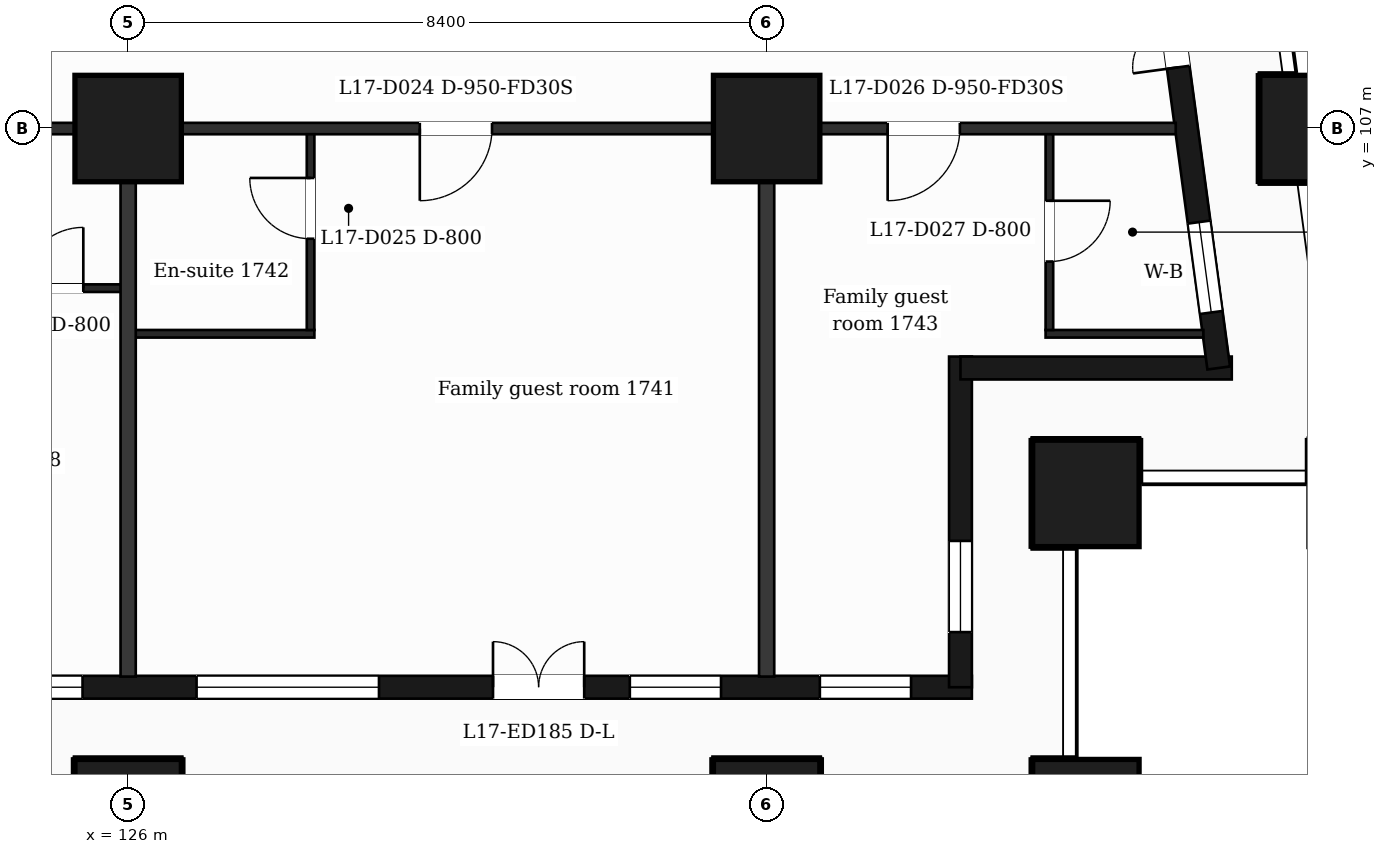
"""IFC4 building model, lengths in metres.
Left out: names, types, materials, properties, quantities, classifications, styles, units other than length and angle.
Written with IfcOpenShell. Run it as: python <this file> out.ifc"""

import sys

from ifc_helpers import new_model, si_unit, direction, frame, frame_2d, origin, origin_2d, place, context, subcontext, project, spatial, rectangle, extrude, element, fill, save


model = new_model("IFC4")
c1 = context("Model", 3, precision=1e-05, world=origin(), true_north=direction((0.0, 1.0)))
c2 = subcontext(c1, "Body", "Model", "MODEL_VIEW")
j1 = project(units=[si_unit("LENGTHUNIT", "METRE"), si_unit("PLANEANGLEUNIT", "RADIAN")], contexts=[c1])
p1 = place(None, origin())
s1 = spatial("IfcSite", under=j1, at=p1, CompositionType="ELEMENT")
p2 = place(p1, origin())
s2 = spatial("IfcBuilding", under=s1, at=p2, CompositionType="ELEMENT")
p3 = place(p2, frame((0.0, 0.0, 77.5)))
s3 = spatial("IfcBuildingStorey", under=s2, at=p3, CompositionType="ELEMENT", Elevation=77.5)
for number, where, z_axis, x_axis in (
    (1, (126.0, 98.0, 0.0), (0.0, 0.0, 1.0), (1.0, 0.0, 0.0)),
    (2, (134.4, 98.0, 0.0), (0.0, 0.0, 1.0), (1.0, 0.0, 0.0)),
    (3, (138.6, 98.0, 0.0), (0.0, 0.0, 1.0), (1.0, 0.0, 0.0)),
    (4, (138.6, 102.2, 0.0), (0.0, 0.0, 1.0), (1.0, 0.0, 0.0)),
    (5, (126.0, 107.0, 0.0), (0.0, 0.0, 1.0), (1.0, 0.0, 0.0)),
    (6, (134.4, 107.0, 0.0), (0.0, 0.0, 1.0), (1.0, 0.0, 0.0)),
    (7, (141.588, 107.0, 0.0), (0.0, 0.0, 1.0), (1.0, 0.0, 0.0)),
):
    element("IfcColumn", number, at=place(p3, frame(where, z_axis=z_axis, x_axis=x_axis)), inside=s3, PredefinedType="COLUMN", context=c2, shape_type="SweptSolid", body=[
        extrude(rectangle(XDim=1.4, YDim=1.4, at=origin_2d()), origin(), (0.0, 0.0, 1.0), 3.5),
    ])
p4 = place(p3, frame((89.85, 99.65, 0.0), z_axis=(0.0, 0.0, 1.0), x_axis=(1.0, 0.0, 0.0)))
e8 = element("IfcWall", 8, at=p4, inside=s3, PredefinedType="SOLIDWALL", context=c2, shape_type="SweptSolid", body=[
    extrude(rectangle(XDim=47.25, YDim=0.3, at=frame_2d((23.625, 0.0))), origin(), (0.0, 0.0, 1.0), 3.0),
])
p5 = place(p4, frame((0.725, 0.0, 0.9)))
e9 = element("IfcOpeningElement", 9, at=p5, cuts=e8, PredefinedType="OPENING", context=c2, shape_type="SweptSolid", body=[
    extrude(rectangle(XDim=1.2, YDim=2.1, at=frame_2d((0.6, 1.05))), frame((0.0, 0.16, 0.0), z_axis=(0.0, -1.0, 0.0), x_axis=(1.0, 0.0, 0.0)), (0.0, 0.0, 1.0), 0.32),
])
p6 = place(p4, frame((3.45, 0.0, 0.9)))
e10 = element("IfcOpeningElement", 10, at=p6, cuts=e8, PredefinedType="OPENING", context=c2, shape_type="SweptSolid", body=[
    extrude(rectangle(XDim=2.4, YDim=2.1, at=frame_2d((1.2, 1.05))), frame((0.0, 0.16, 0.0), z_axis=(0.0, -1.0, 0.0), x_axis=(1.0, 0.0, 0.0)), (0.0, 0.0, 1.0), 0.32),
])
p7 = place(p4, frame((7.65, 0.0, 0.9)))
e11 = element("IfcOpeningElement", 11, at=p7, cuts=e8, PredefinedType="OPENING", context=c2, shape_type="SweptSolid", body=[
    extrude(rectangle(XDim=2.4, YDim=2.1, at=frame_2d((1.2, 1.05))), frame((0.0, 0.16, 0.0), z_axis=(0.0, -1.0, 0.0), x_axis=(1.0, 0.0, 0.0)), (0.0, 0.0, 1.0), 0.32),
])
p8 = place(p4, frame((11.85, 0.0, 0.9)))
e12 = element("IfcOpeningElement", 12, at=p8, cuts=e8, PredefinedType="OPENING", context=c2, shape_type="SweptSolid", body=[
    extrude(rectangle(XDim=2.4, YDim=2.1, at=frame_2d((1.2, 1.05))), frame((0.0, 0.16, 0.0), z_axis=(0.0, -1.0, 0.0), x_axis=(1.0, 0.0, 0.0)), (0.0, 0.0, 1.0), 0.32),
])
p9 = place(p4, frame((16.05, 0.0, 0.9)))
e13 = element("IfcOpeningElement", 13, at=p9, cuts=e8, PredefinedType="OPENING", context=c2, shape_type="SweptSolid", body=[
    extrude(rectangle(XDim=2.4, YDim=2.1, at=frame_2d((1.2, 1.05))), frame((0.0, 0.16, 0.0), z_axis=(0.0, -1.0, 0.0), x_axis=(1.0, 0.0, 0.0)), (0.0, 0.0, 1.0), 0.32),
])
p10 = place(p4, frame((20.25, 0.0, 0.9)))
e14 = element("IfcOpeningElement", 14, at=p10, cuts=e8, PredefinedType="OPENING", context=c2, shape_type="SweptSolid", body=[
    extrude(rectangle(XDim=2.4, YDim=2.1, at=frame_2d((1.2, 1.05))), frame((0.0, 0.16, 0.0), z_axis=(0.0, -1.0, 0.0), x_axis=(1.0, 0.0, 0.0)), (0.0, 0.0, 1.0), 0.32),
])
p11 = place(p4, frame((25.05, 0.0, 0.9)))
e15 = element("IfcOpeningElement", 15, at=p11, cuts=e8, PredefinedType="OPENING", context=c2, shape_type="SweptSolid", body=[
    extrude(rectangle(XDim=1.2, YDim=2.1, at=frame_2d((0.6, 1.05))), frame((0.0, 0.16, 0.0), z_axis=(0.0, -1.0, 0.0), x_axis=(1.0, 0.0, 0.0)), (0.0, 0.0, 1.0), 0.32),
])
p12 = place(p4, frame((29.25, 0.0, 0.9)))
e16 = element("IfcOpeningElement", 16, at=p12, cuts=e8, PredefinedType="OPENING", context=c2, shape_type="SweptSolid", body=[
    extrude(rectangle(XDim=1.2, YDim=2.1, at=frame_2d((0.6, 1.05))), frame((0.0, 0.16, 0.0), z_axis=(0.0, -1.0, 0.0), x_axis=(1.0, 0.0, 0.0)), (0.0, 0.0, 1.0), 0.32),
])
p13 = place(p4, frame((32.55, 0.0, 0.0)))
e17 = element("IfcOpeningElement", 17, at=p13, cuts=e8, PredefinedType="OPENING", context=c2, shape_type="SweptSolid", body=[
    extrude(rectangle(XDim=1.2, YDim=2.4, at=frame_2d((0.6, 1.2))), frame((0.0, 0.16, 0.0), z_axis=(0.0, -1.0, 0.0), x_axis=(1.0, 0.0, 0.0)), (0.0, 0.0, 1.0), 0.32),
])
p14 = place(p4, frame((34.35, 0.0, 0.9)))
e18 = element("IfcOpeningElement", 18, at=p14, cuts=e8, PredefinedType="OPENING", context=c2, shape_type="SweptSolid", body=[
    extrude(rectangle(XDim=1.2, YDim=2.1, at=frame_2d((0.6, 1.05))), frame((0.0, 0.16, 0.0), z_axis=(0.0, -1.0, 0.0), x_axis=(1.0, 0.0, 0.0)), (0.0, 0.0, 1.0), 0.32),
])
p15 = place(p4, frame((37.05, 0.0, 0.9)))
e19 = element("IfcOpeningElement", 19, at=p15, cuts=e8, PredefinedType="OPENING", context=c2, shape_type="SweptSolid", body=[
    extrude(rectangle(XDim=2.4, YDim=2.1, at=frame_2d((1.2, 1.05))), frame((0.0, 0.16, 0.0), z_axis=(0.0, -1.0, 0.0), x_axis=(1.0, 0.0, 0.0)), (0.0, 0.0, 1.0), 0.32),
])
p16 = place(p4, frame((40.95, 0.0, 0.0)))
e20 = element("IfcOpeningElement", 20, at=p16, cuts=e8, PredefinedType="OPENING", context=c2, shape_type="SweptSolid", body=[
    extrude(rectangle(XDim=1.2, YDim=2.4, at=frame_2d((0.6, 1.2))), frame((0.0, 0.16, 0.0), z_axis=(0.0, -1.0, 0.0), x_axis=(1.0, 0.0, 0.0)), (0.0, 0.0, 1.0), 0.32),
])
p17 = place(p4, frame((42.75, 0.0, 0.9)))
e21 = element("IfcOpeningElement", 21, at=p17, cuts=e8, PredefinedType="OPENING", context=c2, shape_type="SweptSolid", body=[
    extrude(rectangle(XDim=1.2, YDim=2.1, at=frame_2d((0.6, 1.05))), frame((0.0, 0.16, 0.0), z_axis=(0.0, -1.0, 0.0), x_axis=(1.0, 0.0, 0.0)), (0.0, 0.0, 1.0), 0.32),
])
p18 = place(p4, frame((45.25, 0.0, 0.9)))
e22 = element("IfcOpeningElement", 22, at=p18, cuts=e8, PredefinedType="OPENING", context=c2, shape_type="SweptSolid", body=[
    extrude(rectangle(XDim=1.2, YDim=2.1, at=frame_2d((0.6, 1.05))), frame((0.0, 0.16, 0.0), z_axis=(0.0, -1.0, 0.0), x_axis=(1.0, 0.0, 0.0)), (0.0, 0.0, 1.0), 0.32),
])
p19 = place(p3, frame((136.95, 99.65, 0.0), z_axis=(0.0, 0.0, 1.0), x_axis=(0.0, 1.0, 0.0)))
e23 = element("IfcWall", 23, at=p19, inside=s3, PredefinedType="SOLIDWALL", context=c2, shape_type="SweptSolid", body=[
    extrude(rectangle(XDim=4.35, YDim=0.3, at=frame_2d((2.175, 0.0))), origin(), (0.0, 0.0, 1.0), 3.0),
])
p20 = place(p19, frame((0.725, 0.0, 0.9)))
e24 = element("IfcOpeningElement", 24, at=p20, cuts=e23, PredefinedType="OPENING", context=c2, shape_type="SweptSolid", body=[
    extrude(rectangle(XDim=1.2, YDim=2.1, at=frame_2d((0.6, 1.05))), frame((0.0, 0.16, 0.0), z_axis=(0.0, -1.0, 0.0), x_axis=(1.0, 0.0, 0.0)), (0.0, 0.0, 1.0), 0.32),
])
p21 = place(p3, frame((136.95, 103.85, 0.0), z_axis=(0.0, 0.0, 1.0), x_axis=(1.0, 0.0, 0.0)))
e25 = element("IfcWall", 25, at=p21, inside=s3, PredefinedType="SOLIDWALL", context=c2, shape_type="SweptSolid", body=[
    extrude(rectangle(XDim=3.569, YDim=0.3, at=frame_2d((1.785, 0.0))), origin(), (0.0, 0.0, 1.0), 3.0),
])
p22 = place(p3, frame((140.348, 103.85, 0.0), z_axis=(0.0, 0.0, 1.0), x_axis=(-0.133431549479, 0.991058031401, 0.0)))
e26 = element("IfcWall", 26, at=p22, inside=s3, PredefinedType="SOLIDWALL", context=c2, shape_type="SweptSolid", body=[
    extrude(rectangle(XDim=6.609, YDim=0.3, at=frame_2d((3.304, 0.0))), origin(), (0.0, 0.0, 1.0), 3.0),
])
p23 = place(p22, frame((0.737, 0.0, 0.9)))
e27 = element("IfcOpeningElement", 27, at=p23, cuts=e26, PredefinedType="OPENING", context=c2, shape_type="SweptSolid", body=[
    extrude(rectangle(XDim=1.2, YDim=2.1, at=frame_2d((0.6, 1.05))), frame((0.0, 0.16, 0.0), z_axis=(0.0, -1.0, 0.0), x_axis=(1.0, 0.0, 0.0)), (0.0, 0.0, 1.0), 0.32),
])
p24 = place(p22, frame((3.991, 0.0, 0.0)))
e28 = element("IfcOpeningElement", 28, at=p24, cuts=e26, PredefinedType="OPENING", context=c2, shape_type="SweptSolid", body=[
    extrude(rectangle(XDim=1.2, YDim=2.4, at=frame_2d((0.6, 1.2))), frame((0.0, 0.16, 0.0), z_axis=(0.0, -1.0, 0.0), x_axis=(1.0, 0.0, 0.0)), (0.0, 0.0, 1.0), 0.32),
])
p25 = place(p3, frame((126.0, 104.3, 0.0), z_axis=(0.0, 0.0, 1.0), x_axis=(1.0, 0.0, 0.0)))
e29 = element("IfcWall", 29, at=p25, inside=s3, PredefinedType="PARTITIONING", context=c2, shape_type="SweptSolid", body=[
    extrude(rectangle(XDim=2.45, YDim=0.1, at=frame_2d((1.225, 0.0))), origin(), (0.0, 0.0, 1.0), 3.0),
])
p26 = place(p3, frame((138.07, 104.3, 0.0), z_axis=(0.0, 0.0, 1.0), x_axis=(1.0, 0.0, 0.0)))
e30 = element("IfcWall", 30, at=p26, inside=s3, PredefinedType="PARTITIONING", context=c2, shape_type="SweptSolid", body=[
    extrude(rectangle(XDim=2.076, YDim=0.1, at=frame_2d((1.038, 0.0))), origin(), (0.0, 0.0, 1.0), 3.0),
])
p27 = place(p3, frame((123.85, 104.9, 0.0), z_axis=(0.0, 0.0, 1.0), x_axis=(1.0, 0.0, 0.0)))
e31 = element("IfcWall", 31, at=p27, inside=s3, PredefinedType="PARTITIONING", context=c2, shape_type="SweptSolid", body=[
    extrude(rectangle(XDim=2.15, YDim=0.1, at=frame_2d((1.075, 0.0))), origin(), (0.0, 0.0, 1.0), 3.0),
])
p28 = place(p27, frame((0.76, 0.0, 0.0)))
e32 = element("IfcOpeningElement", 32, at=p28, cuts=e31, PredefinedType="OPENING", context=c2, shape_type="SweptSolid", body=[
    extrude(rectangle(XDim=0.8, YDim=2.1, at=frame_2d((0.4, 1.05))), frame((0.0, 0.06, 0.0), z_axis=(0.0, -1.0, 0.0), x_axis=(1.0, 0.0, 0.0)), (0.0, 0.0, 1.0), 0.12),
])
p29 = place(p3, frame((87.018, 107.0, 0.0), z_axis=(0.0, 0.0, 1.0), x_axis=(1.0, 0.0, 0.0)))
e33 = element("IfcWall", 33, at=p29, inside=s3, PredefinedType="PARTITIONING", context=c2, shape_type="SweptSolid", body=[
    extrude(rectangle(XDim=52.765, YDim=0.15, at=frame_2d((26.382, 0.0))), origin(), (0.0, 0.0, 1.0), 3.0),
])
p30 = place(p29, frame((1.276, 0.0, 0.0)))
e34 = element("IfcOpeningElement", 34, at=p30, cuts=e33, PredefinedType="OPENING", context=c2, shape_type="SweptSolid", body=[
    extrude(rectangle(XDim=0.95, YDim=2.1, at=frame_2d((0.475, 1.05))), frame((0.0, 0.085, 0.0), z_axis=(0.0, -1.0, 0.0), x_axis=(1.0, 0.0, 0.0)), (0.0, 0.0, 1.0), 0.17),
])
p31 = place(p29, frame((10.757, 0.0, 0.0)))
e35 = element("IfcOpeningElement", 35, at=p31, cuts=e33, PredefinedType="OPENING", context=c2, shape_type="SweptSolid", body=[
    extrude(rectangle(XDim=1.0, YDim=2.1, at=frame_2d((0.5, 1.05))), frame((0.0, 0.085, 0.0), z_axis=(0.0, -1.0, 0.0), x_axis=(1.0, 0.0, 0.0)), (0.0, 0.0, 1.0), 0.17),
])
p32 = place(p29, frame((23.125, 0.0, 0.0)))
e36 = element("IfcOpeningElement", 36, at=p32, cuts=e33, PredefinedType="OPENING", context=c2, shape_type="SweptSolid", body=[
    extrude(rectangle(XDim=0.95, YDim=2.1, at=frame_2d((0.475, 1.05))), frame((0.0, 0.085, 0.0), z_axis=(0.0, -1.0, 0.0), x_axis=(1.0, 0.0, 0.0)), (0.0, 0.0, 1.0), 0.17),
])
p33 = place(p29, frame((31.757, 0.0, 0.0)))
e37 = element("IfcOpeningElement", 37, at=p33, cuts=e33, PredefinedType="OPENING", context=c2, shape_type="SweptSolid", body=[
    extrude(rectangle(XDim=1.0, YDim=2.1, at=frame_2d((0.5, 1.05))), frame((0.0, 0.085, 0.0), z_axis=(0.0, -1.0, 0.0), x_axis=(1.0, 0.0, 0.0)), (0.0, 0.0, 1.0), 0.17),
])
p34 = place(p29, frame((42.819, 0.0, 0.0)))
e38 = element("IfcOpeningElement", 38, at=p34, cuts=e33, PredefinedType="OPENING", context=c2, shape_type="SweptSolid", body=[
    extrude(rectangle(XDim=0.95, YDim=2.1, at=frame_2d((0.475, 1.05))), frame((0.0, 0.085, 0.0), z_axis=(0.0, -1.0, 0.0), x_axis=(1.0, 0.0, 0.0)), (0.0, 0.0, 1.0), 0.17),
])
p35 = place(p29, frame((48.974, 0.0, 0.0)))
e39 = element("IfcOpeningElement", 39, at=p35, cuts=e33, PredefinedType="OPENING", context=c2, shape_type="SweptSolid", body=[
    extrude(rectangle(XDim=0.95, YDim=2.1, at=frame_2d((0.475, 1.05))), frame((0.0, 0.085, 0.0), z_axis=(0.0, -1.0, 0.0), x_axis=(1.0, 0.0, 0.0)), (0.0, 0.0, 1.0), 0.17),
])
p36 = place(p3, frame((126.0, 99.79, 0.0), z_axis=(0.0, 0.0, 1.0), x_axis=(0.0, 1.0, 0.0)))
e40 = element("IfcWall", 40, at=p36, inside=s3, PredefinedType="PARTITIONING", context=c2, shape_type="SweptSolid", body=[
    extrude(rectangle(XDim=7.135, YDim=0.2, at=frame_2d((3.567, 0.0))), origin(), (0.0, 0.0, 1.0), 3.0),
])
p37 = place(p3, frame((128.4, 104.35, 0.0), z_axis=(0.0, 0.0, 1.0), x_axis=(0.0, 1.0, 0.0)))
e41 = element("IfcWall", 41, at=p37, inside=s3, PredefinedType="PARTITIONING", context=c2, shape_type="SweptSolid", body=[
    extrude(rectangle(XDim=2.575, YDim=0.1, at=frame_2d((1.288, 0.0))), origin(), (0.0, 0.0, 1.0), 3.0),
])
p38 = place(p37, frame((1.2, 0.0, 0.0)))
e42 = element("IfcOpeningElement", 42, at=p38, cuts=e41, PredefinedType="OPENING", context=c2, shape_type="SweptSolid", body=[
    extrude(rectangle(XDim=0.8, YDim=2.1, at=frame_2d((0.4, 1.05))), frame((0.0, 0.06, 0.0), z_axis=(0.0, -1.0, 0.0), x_axis=(1.0, 0.0, 0.0)), (0.0, 0.0, 1.0), 0.12),
])
p39 = place(p3, frame((134.4, 99.79, 0.0), z_axis=(0.0, 0.0, 1.0), x_axis=(0.0, 1.0, 0.0)))
e43 = element("IfcWall", 43, at=p39, inside=s3, PredefinedType="PARTITIONING", context=c2, shape_type="SweptSolid", body=[
    extrude(rectangle(XDim=7.135, YDim=0.2, at=frame_2d((3.567, 0.0))), origin(), (0.0, 0.0, 1.0), 3.0),
])
p40 = place(p3, frame((138.12, 104.35, 0.0), z_axis=(0.0, 0.0, 1.0), x_axis=(0.0, 1.0, 0.0)))
e44 = element("IfcWall", 44, at=p40, inside=s3, PredefinedType="PARTITIONING", context=c2, shape_type="SweptSolid", body=[
    extrude(rectangle(XDim=2.575, YDim=0.1, at=frame_2d((1.288, 0.0))), origin(), (0.0, 0.0, 1.0), 3.0),
])
p41 = place(p40, frame((0.9, 0.0, 0.0)))
e45 = element("IfcOpeningElement", 45, at=p41, cuts=e44, PredefinedType="OPENING", context=c2, shape_type="SweptSolid", body=[
    extrude(rectangle(XDim=0.8, YDim=2.1, at=frame_2d((0.4, 1.05))), frame((0.0, 0.06, 0.0), z_axis=(0.0, -1.0, 0.0), x_axis=(1.0, 0.0, 0.0)), (0.0, 0.0, 1.0), 0.12),
])
p42 = place(p14, origin())
e46 = element("IfcWindow", 46, at=p42, inside=s3, PartitioningType="SINGLE_PANEL", PredefinedType="WINDOW", context=c2, shape_type="SweptSolid", body=[
    extrude(rectangle(XDim=1.2, YDim=2.1, at=frame_2d((0.6, 1.05))), frame((0.0, 0.03, 0.0), z_axis=(0.0, -1.0, 0.0), x_axis=(1.0, 0.0, 0.0)), (0.0, 0.0, 1.0), 0.06),
])
fill(e18, e46)
p43 = place(p15, origin())
e47 = element("IfcWindow", 47, at=p43, inside=s3, PartitioningType="SINGLE_PANEL", PredefinedType="WINDOW", context=c2, shape_type="SweptSolid", body=[
    extrude(rectangle(XDim=2.4, YDim=2.1, at=frame_2d((1.2, 1.05))), frame((0.0, 0.03, 0.0), z_axis=(0.0, -1.0, 0.0), x_axis=(1.0, 0.0, 0.0)), (0.0, 0.0, 1.0), 0.06),
])
fill(e19, e47)
p44 = place(p16, origin())
e48 = element("IfcDoor", 48, at=p44, inside=s3, OperationType="DOUBLE_DOOR_SINGLE_SWING", PredefinedType="DOOR", context=c2, shape_type="SweptSolid", body=[
    extrude(rectangle(XDim=1.2, YDim=2.4, at=frame_2d((0.6, 1.2))), frame((0.0, 0.025, 0.0), z_axis=(0.0, -1.0, 0.0), x_axis=(1.0, 0.0, 0.0)), (0.0, 0.0, 1.0), 0.05),
])
fill(e20, e48)
p45 = place(p17, origin())
e49 = element("IfcWindow", 49, at=p45, inside=s3, PartitioningType="SINGLE_PANEL", PredefinedType="WINDOW", context=c2, shape_type="SweptSolid", body=[
    extrude(rectangle(XDim=1.2, YDim=2.1, at=frame_2d((0.6, 1.05))), frame((0.0, 0.03, 0.0), z_axis=(0.0, -1.0, 0.0), x_axis=(1.0, 0.0, 0.0)), (0.0, 0.0, 1.0), 0.06),
])
fill(e21, e49)
p46 = place(p18, origin())
e50 = element("IfcWindow", 50, at=p46, inside=s3, PartitioningType="SINGLE_PANEL", PredefinedType="WINDOW", context=c2, shape_type="SweptSolid", body=[
    extrude(rectangle(XDim=1.2, YDim=2.1, at=frame_2d((0.6, 1.05))), frame((0.0, 0.03, 0.0), z_axis=(0.0, -1.0, 0.0), x_axis=(1.0, 0.0, 0.0)), (0.0, 0.0, 1.0), 0.06),
])
fill(e22, e50)
p47 = place(p20, origin())
e51 = element("IfcWindow", 51, at=p47, inside=s3, PartitioningType="SINGLE_PANEL", PredefinedType="WINDOW", context=c2, shape_type="SweptSolid", body=[
    extrude(rectangle(XDim=1.2, YDim=2.1, at=frame_2d((0.6, 1.05))), frame((0.0, 0.03, 0.0), z_axis=(0.0, -1.0, 0.0), x_axis=(1.0, 0.0, 0.0)), (0.0, 0.0, 1.0), 0.06),
])
fill(e24, e51)
p48 = place(p23, origin())
e52 = element("IfcWindow", 52, at=p48, inside=s3, PartitioningType="SINGLE_PANEL", PredefinedType="WINDOW", context=c2, shape_type="SweptSolid", body=[
    extrude(rectangle(XDim=1.2, YDim=2.1, at=frame_2d((0.6, 1.05))), frame((0.0, 0.03, 0.0), z_axis=(0.0, -1.0, 0.0), x_axis=(1.0, 0.0, 0.0)), (0.0, 0.0, 1.0), 0.06),
])
fill(e27, e52)
p49 = place(p24, origin())
e53 = element("IfcDoor", 53, at=p49, inside=s3, OperationType="DOUBLE_DOOR_SINGLE_SWING", PredefinedType="DOOR", context=c2, shape_type="SweptSolid", body=[
    extrude(rectangle(XDim=1.2, YDim=2.4, at=frame_2d((0.6, 1.2))), frame((0.0, 0.025, 0.0), z_axis=(0.0, -1.0, 0.0), x_axis=(1.0, 0.0, 0.0)), (0.0, 0.0, 1.0), 0.05),
])
fill(e28, e53)
p50 = place(p28, origin())
e54 = element("IfcDoor", 54, at=p50, inside=s3, OperationType="SINGLE_SWING_RIGHT", PredefinedType="DOOR", context=c2, shape_type="SweptSolid", body=[
    extrude(rectangle(XDim=0.8, YDim=2.1, at=frame_2d((0.4, 1.05))), frame((0.0, 0.025, 0.0), z_axis=(0.0, -1.0, 0.0), x_axis=(1.0, 0.0, 0.0)), (0.0, 0.0, 1.0), 0.05),
])
fill(e32, e54)
p51 = place(p34, origin())
e55 = element("IfcDoor", 55, at=p51, inside=s3, OperationType="SINGLE_SWING_LEFT", PredefinedType="DOOR", context=c2, shape_type="SweptSolid", body=[
    extrude(rectangle(XDim=0.95, YDim=2.1, at=frame_2d((0.475, 1.05))), frame((0.0, 0.025, 0.0), z_axis=(0.0, -1.0, 0.0), x_axis=(1.0, 0.0, 0.0)), (0.0, 0.0, 1.0), 0.05),
])
fill(e38, e55)
p52 = place(p38, origin())
e56 = element("IfcDoor", 56, at=p52, inside=s3, OperationType="SINGLE_SWING_RIGHT", PredefinedType="DOOR", context=c2, shape_type="SweptSolid", body=[
    extrude(rectangle(XDim=0.8, YDim=2.1, at=frame_2d((0.4, 1.05))), frame((0.0, 0.025, 0.0), z_axis=(0.0, -1.0, 0.0), x_axis=(1.0, 0.0, 0.0)), (0.0, 0.0, 1.0), 0.05),
])
fill(e42, e56)
p53 = place(p35, origin())
e57 = element("IfcDoor", 57, at=p53, inside=s3, OperationType="SINGLE_SWING_LEFT", PredefinedType="DOOR", context=c2, shape_type="SweptSolid", body=[
    extrude(rectangle(XDim=0.95, YDim=2.1, at=frame_2d((0.475, 1.05))), frame((0.0, 0.025, 0.0), z_axis=(0.0, -1.0, 0.0), x_axis=(1.0, 0.0, 0.0)), (0.0, 0.0, 1.0), 0.05),
])
fill(e39, e57)
p54 = place(p41, origin())
e58 = element("IfcDoor", 58, at=p54, inside=s3, OperationType="SINGLE_SWING_RIGHT", PredefinedType="DOOR", context=c2, shape_type="SweptSolid", body=[
    extrude(rectangle(XDim=0.8, YDim=2.1, at=frame_2d((0.4, 1.05))), frame((0.0, 0.025, 0.0), z_axis=(0.0, -1.0, 0.0), x_axis=(1.0, 0.0, 0.0)), (0.0, 0.0, 1.0), 0.05),
])
fill(e45, e58)
save(model, sys.argv[1])
